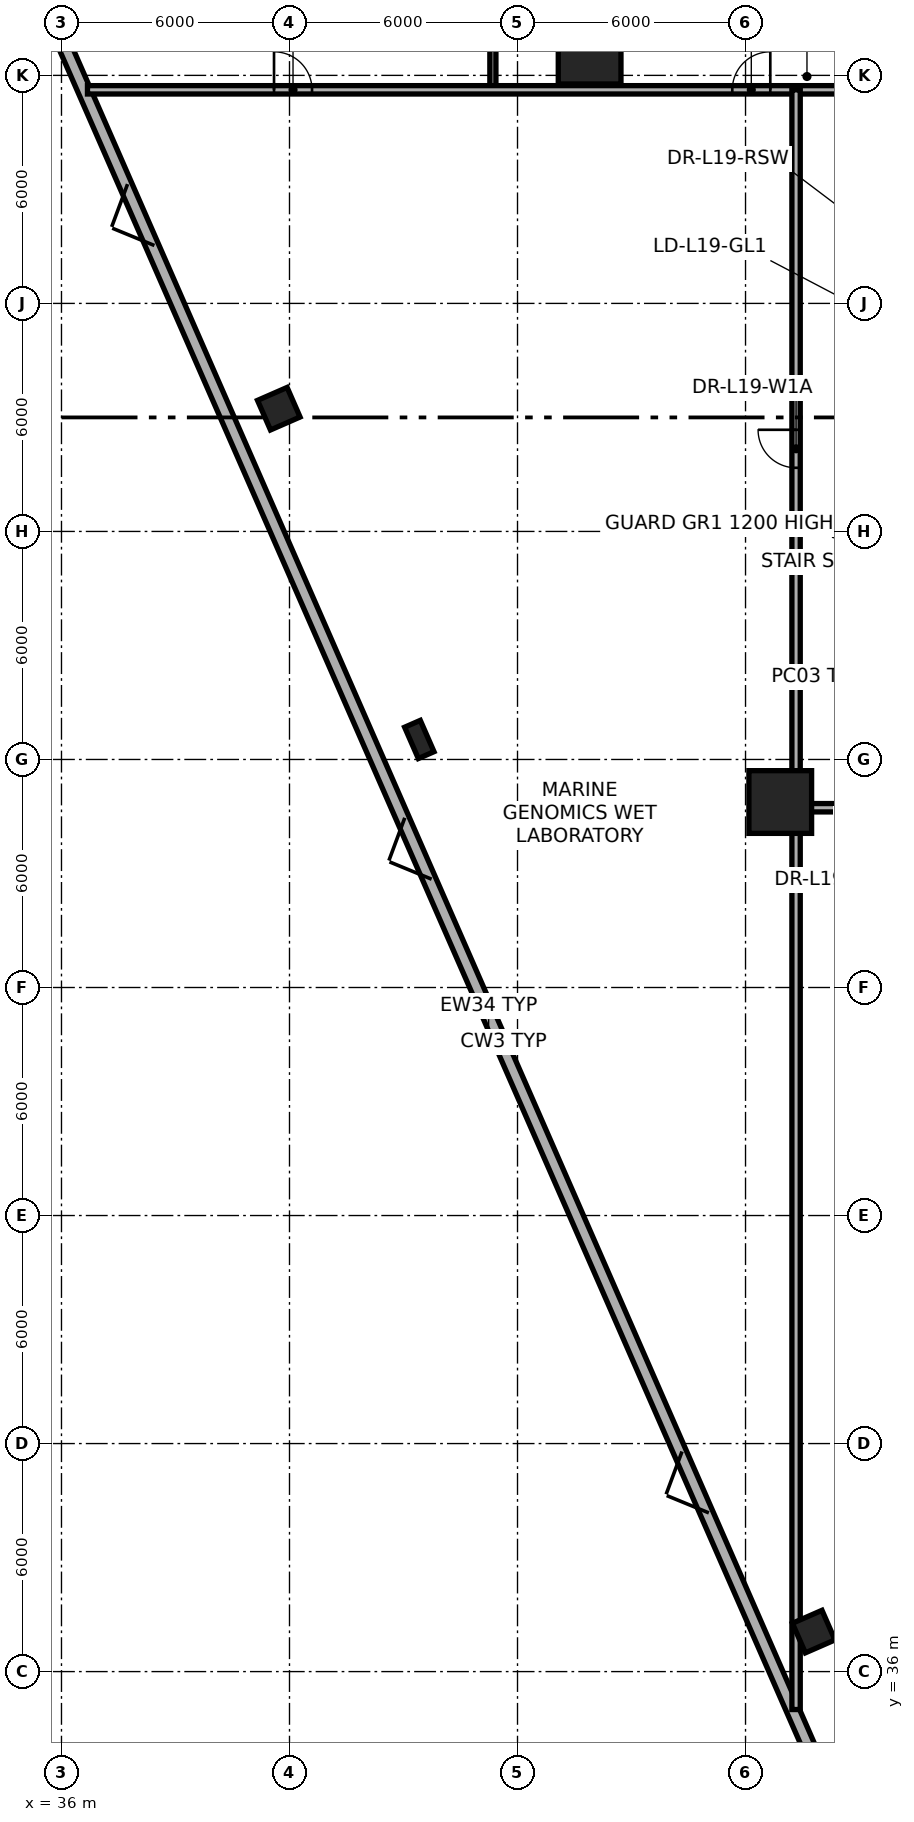
"""IFC4 building model, lengths in metres.
Left out: names, types, materials, properties, quantities, classifications, styles, units other than length and angle.
Written with IfcOpenShell. Run it as: python <this file> out.ifc"""

import sys

from ifc_helpers import new_model, si_unit, direction, frame, frame_2d, origin, origin_2d, place, context, subcontext, project, spatial, rectangle, extrude, element, fill, save


model = new_model("IFC4")
c1 = context("Model", 3, precision=1e-05, world=origin(), true_north=direction((0.0, 1.0)))
c2 = subcontext(c1, "Body", "Model", "MODEL_VIEW")
j1 = project(units=[si_unit("LENGTHUNIT", "METRE"), si_unit("PLANEANGLEUNIT", "RADIAN")], contexts=[c1])
p1 = place(None, origin())
s1 = spatial("IfcSite", under=j1, at=p1, CompositionType="ELEMENT")
p2 = place(p1, origin())
s2 = spatial("IfcBuilding", under=s1, at=p2, CompositionType="ELEMENT")
p3 = place(p2, frame((0.0, 0.0, 75.0)))
s3 = spatial("IfcBuildingStorey", under=s2, at=p3, CompositionType="ELEMENT", Elevation=75.0)
for number, where, z_axis, x_axis in (
    (1, (49.898, 78.599, 0.0), (0.0, 0.0, 1.0), (1.0, 0.0, 0.0)),
    (2, (54.914, 58.88, 0.0), (0.0, 0.0, 1.0), (1.0, 0.0, 0.0)),
):
    element("IfcColumn", number, at=place(p3, frame(where, z_axis=z_axis, x_axis=x_axis)), inside=s3, PredefinedType="COLUMN", context=c2, shape_type="SweptSolid", body=[
        extrude(rectangle(XDim=1.65, YDim=1.65, at=origin_2d()), origin(), (0.0, 0.0, 1.0), 3.65),
    ])
p4 = place(p3, frame((41.647, 69.24, 0.003), z_axis=(0.039229493406, -0.00569028488, 0.999214024874), x_axis=(0.963504381608, 0.265217589574, -0.036317169537)))
e3 = element("IfcColumn", 3, at=p4, inside=s3, PredefinedType="COLUMN", context=c2, shape_type="SweptSolid", body=[
    extrude(rectangle(XDim=0.85, YDim=0.85, at=origin_2d()), origin(), (0.0, 0.0, 1.0), 3.647),
])
p5 = place(p3, frame((45.358, 60.507, 0.003), z_axis=(0.032073367297, 0.010512565064, 0.999430230224), x_axis=(0.745277761869, 0.666036657731, -0.030922940051)))
e4 = element("IfcColumn", 4, at=p5, inside=s3, PredefinedType="PILASTER", context=c2, shape_type="SweptSolid", body=[
    extrude(rectangle(XDim=0.9, YDim=0.45, at=origin_2d()), origin(), (0.0, 0.0, 1.0), 3.646),
])
p6 = place(p3, frame((55.771, 36.953, 0.003), z_axis=(0.012375141264, 0.054450621561, 0.998439775695), x_axis=(-0.188087847119, 0.980818932993, -0.05115840545)))
e5 = element("IfcColumn", 5, at=p6, inside=s3, PredefinedType="COLUMN", context=c2, shape_type="SweptSolid", body=[
    extrude(rectangle(XDim=0.85, YDim=0.85, at=origin_2d()), origin(), (0.0, 0.0, 1.0), 3.65),
])
p7 = place(p3, frame((61.236, 21.291, 0.0), z_axis=(0.0, 0.0, 1.0), x_axis=(-0.400832536075, 0.916151340131, 0.0)))
e6 = element("IfcWall", 6, at=p7, inside=s3, PredefinedType="STANDARD", context=c2, shape_type="SweptSolid", body=[
    extrude(rectangle(XDim=68.233, YDim=0.34, at=frame_2d((34.117, 0.0))), origin(), (0.0, 0.0, 1.0), 0.85),
])
p8 = place(p3, frame((47.352, 77.62, 0.0), z_axis=(0.0, 0.0, 1.0), x_axis=(0.0, 1.0, 0.0)))
e7 = element("IfcWall", 7, at=p8, inside=s3, PredefinedType="PARTITIONING", context=c2, shape_type="SweptSolid", body=[
    extrude(rectangle(XDim=13.382, YDim=0.16, at=frame_2d((6.691, 0.0))), origin(), (0.0, 0.0, 1.0), 3.375),
])
p9 = place(p3, frame((36.684, 77.62, 0.0), z_axis=(0.0, 0.0, 1.0), x_axis=(1.0, 0.0, 0.0)))
e8 = element("IfcWall", 8, at=p9, inside=s3, PredefinedType="PARTITIONING", context=c2, shape_type="SweptSolid", body=[
    extrude(rectangle(XDim=37.866, YDim=0.22, at=frame_2d((18.933, 0.0))), origin(), (0.0, 0.0, 1.0), 2.505),
])
p10 = place(p9, frame((32.076, 0.0, 0.0)))
e9 = element("IfcOpeningElement", 9, at=p10, cuts=e8, PredefinedType="OPENING", context=c2, shape_type="SweptSolid", body=[
    extrude(rectangle(XDim=0.98, YDim=2.1, at=frame_2d((0.49, 1.05))), frame((0.0, 0.12, 0.0), z_axis=(0.0, -1.0, 0.0), x_axis=(1.0, 0.0, 0.0)), (0.0, 0.0, 1.0), 0.24),
])
p11 = place(p9, frame((34.901, 0.0, 0.0)))
e10 = element("IfcOpeningElement", 10, at=p11, cuts=e8, PredefinedType="OPENING", context=c2, shape_type="SweptSolid", body=[
    extrude(rectangle(XDim=0.98, YDim=2.1, at=frame_2d((0.49, 1.05))), frame((0.0, 0.12, 0.0), z_axis=(0.0, -1.0, 0.0), x_axis=(1.0, 0.0, 0.0)), (0.0, 0.0, 1.0), 0.24),
])
p12 = place(p9, frame((4.909, 0.0, 0.0)))
e11 = element("IfcOpeningElement", 11, at=p12, cuts=e8, PredefinedType="OPENING", context=c2, shape_type="SweptSolid", body=[
    extrude(rectangle(XDim=1.0, YDim=2.1, at=frame_2d((0.5, 1.05))), frame((0.0, 0.12, 0.0), z_axis=(0.0, -1.0, 0.0), x_axis=(1.0, 0.0, 0.0)), (0.0, 0.0, 1.0), 0.24),
])
p13 = place(p9, frame((16.968, 0.0, 0.0)))
e12 = element("IfcOpeningElement", 12, at=p13, cuts=e8, PredefinedType="OPENING", context=c2, shape_type="SweptSolid", body=[
    extrude(rectangle(XDim=1.0, YDim=2.1, at=frame_2d((0.5, 1.05))), frame((0.0, 0.12, 0.0), z_axis=(0.0, -1.0, 0.0), x_axis=(1.0, 0.0, 0.0)), (0.0, 0.0, 1.0), 0.24),
])
p14 = place(p9, frame((27.177, 0.0, 0.0)))
e13 = element("IfcOpeningElement", 13, at=p14, cuts=e8, PredefinedType="OPENING", context=c2, shape_type="SweptSolid", body=[
    extrude(rectangle(XDim=1.0, YDim=2.1, at=frame_2d((0.5, 1.05))), frame((0.0, 0.12, 0.0), z_axis=(0.0, -1.0, 0.0), x_axis=(1.0, 0.0, 0.0)), (0.0, 0.0, 1.0), 0.24),
])
p15 = place(p3, frame((55.33, 58.73, 0.0), z_axis=(0.0, 0.0, 1.0), x_axis=(1.0, 0.0, 0.0)))
e14 = element("IfcWall", 14, at=p15, inside=s3, PredefinedType="PARTITIONING", context=c2, shape_type="SweptSolid", body=[
    extrude(rectangle(XDim=31.721, YDim=0.22, at=frame_2d((15.861, 0.0))), origin(), (0.0, 0.0, 1.0), 2.505),
])
p16 = place(p15, frame((5.06, 0.0, 0.0)))
e15 = element("IfcOpeningElement", 15, at=p16, cuts=e14, PredefinedType="OPENING", context=c2, shape_type="SweptSolid", body=[
    extrude(rectangle(XDim=1.5, YDim=2.2, at=frame_2d((0.75, 1.1))), frame((0.0, 0.12, 0.0), z_axis=(0.0, -1.0, 0.0), x_axis=(1.0, 0.0, 0.0)), (0.0, 0.0, 1.0), 0.24),
])
p17 = place(p15, frame((16.089, 0.0, 0.0)))
e16 = element("IfcOpeningElement", 16, at=p17, cuts=e14, PredefinedType="OPENING", context=c2, shape_type="SweptSolid", body=[
    extrude(rectangle(XDim=1.5, YDim=2.2, at=frame_2d((0.75, 1.1))), frame((0.0, 0.12, 0.0), z_axis=(0.0, -1.0, 0.0), x_axis=(1.0, 0.0, 0.0)), (0.0, 0.0, 1.0), 0.24),
])
p18 = place(p15, frame((26.14, 0.0, 0.0)))
e17 = element("IfcOpeningElement", 17, at=p18, cuts=e14, PredefinedType="OPENING", context=c2, shape_type="SweptSolid", body=[
    extrude(rectangle(XDim=1.5, YDim=2.2, at=frame_2d((0.75, 1.1))), frame((0.0, 0.12, 0.0), z_axis=(0.0, -1.0, 0.0), x_axis=(1.0, 0.0, 0.0)), (0.0, 0.0, 1.0), 0.24),
])
p19 = place(p3, frame((55.33, 35.002, 0.0), z_axis=(0.0, 0.0, 1.0), x_axis=(0.0, 1.0, 0.0)))
e18 = element("IfcWall", 18, at=p19, inside=s3, PredefinedType="PARTITIONING", context=c2, shape_type="SweptSolid", body=[
    extrude(rectangle(XDim=42.618, YDim=0.22, at=frame_2d((21.309, 0.0))), origin(), (0.0, 0.0, 1.0), 2.505),
])
p20 = place(p19, frame((32.673, 0.0, 0.0)))
e19 = element("IfcOpeningElement", 19, at=p20, cuts=e18, PredefinedType="OPENING", context=c2, shape_type="SweptSolid", body=[
    extrude(rectangle(XDim=1.0, YDim=2.1, at=frame_2d((0.5, 1.05))), frame((0.0, 0.12, 0.0), z_axis=(0.0, -1.0, 0.0), x_axis=(1.0, 0.0, 0.0)), (0.0, 0.0, 1.0), 0.24),
])
p21 = place(p12, origin())
e20 = element("IfcDoor", 20, at=p21, inside=s3, OperationType="SINGLE_SWING_LEFT", PredefinedType="DOOR", context=c2, shape_type="SweptSolid", body=[
    extrude(rectangle(XDim=1.0, YDim=2.1, at=frame_2d((0.5, 1.05))), frame((0.0, 0.025, 0.0), z_axis=(0.0, -1.0, 0.0), x_axis=(1.0, 0.0, 0.0)), (0.0, 0.0, 1.0), 0.05),
])
fill(e11, e20)
p22 = place(p13, origin())
e21 = element("IfcDoor", 21, at=p22, inside=s3, OperationType="SINGLE_SWING_RIGHT", PredefinedType="DOOR", context=c2, shape_type="SweptSolid", body=[
    extrude(rectangle(XDim=1.0, YDim=2.1, at=frame_2d((0.5, 1.05))), frame((0.0, 0.025, 0.0), z_axis=(0.0, -1.0, 0.0), x_axis=(1.0, 0.0, 0.0)), (0.0, 0.0, 1.0), 0.05),
])
fill(e12, e21)
p23 = place(p20, origin())
e22 = element("IfcDoor", 22, at=p23, inside=s3, OperationType="SINGLE_SWING_RIGHT", PredefinedType="DOOR", context=c2, shape_type="SweptSolid", body=[
    extrude(rectangle(XDim=1.0, YDim=2.1, at=frame_2d((0.5, 1.05))), frame((0.0, 0.025, 0.0), z_axis=(0.0, -1.0, 0.0), x_axis=(1.0, 0.0, 0.0)), (0.0, 0.0, 1.0), 0.05),
])
fill(e19, e22)
save(model, sys.argv[1])
